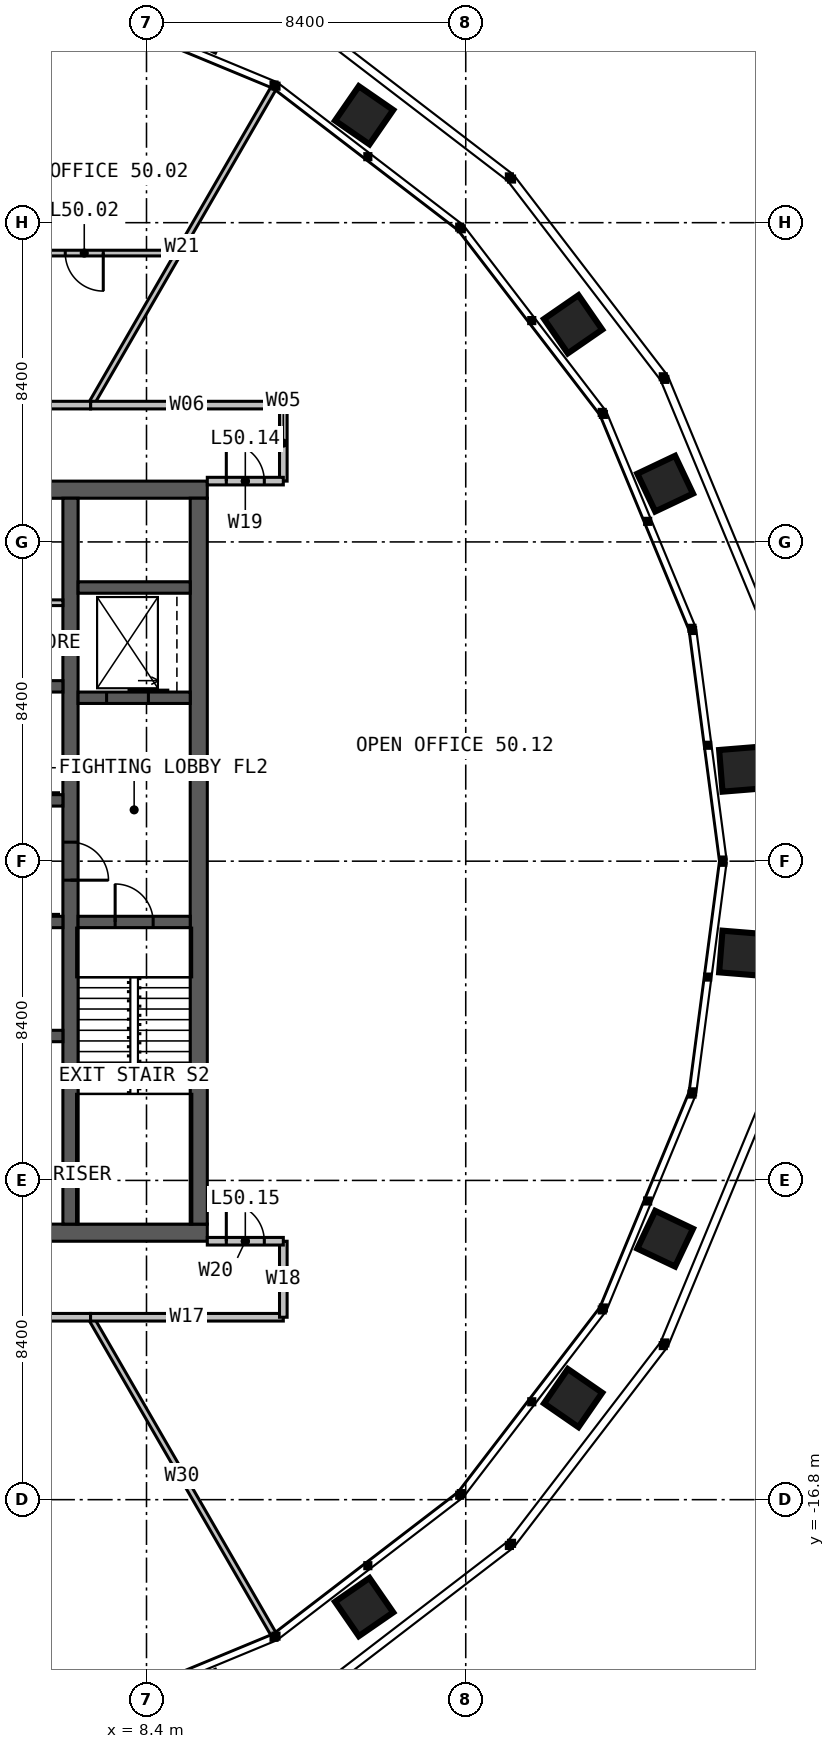
"""IFC4 building model, lengths in metres.
Left out: names, types, materials, properties, quantities, classifications, styles, units other than length and angle.
Written with IfcOpenShell. Run it as: python <this file> out.ifc"""

import sys

from ifc_helpers import new_model, si_unit, direction, frame, frame_2d, origin, place, context, subcontext, project, spatial, rectangle, extrude, element, fill, save


model = new_model("IFC4")
c1 = context("Model", 3, precision=1e-05, world=origin(), true_north=direction((0.0, 1.0)))
c2 = subcontext(c1, "Body", "Model", "MODEL_VIEW")
j1 = project(units=[si_unit("LENGTHUNIT", "METRE"), si_unit("PLANEANGLEUNIT", "RADIAN")], contexts=[c1])
p1 = place(None, origin())
s1 = spatial("IfcSite", under=j1, at=p1, CompositionType="ELEMENT")
p2 = place(p1, origin())
s2 = spatial("IfcBuilding", under=s1, at=p2, CompositionType="ELEMENT")
p3 = place(p2, frame((0.0, 0.0, 207.0)))
s3 = spatial("IfcBuildingStorey", under=s2, at=p3, CompositionType="ELEMENT", Elevation=207.0)
p4 = place(p3, frame((-10.0, 9.775, 0.0), z_axis=(0.0, 0.0, 1.0), x_axis=(1.0, 0.0, 0.0)))
e1 = element("IfcWall", 1, at=p4, inside=s3, PredefinedType="SOLIDWALL", context=c2, shape_type="SweptSolid", body=[
    extrude(rectangle(XDim=20.0, YDim=0.45, at=frame_2d((10.0, 0.0))), origin(), (0.0, 0.0, 1.0), 4.0),
])
p5 = place(p4, frame((9.4, 0.0, 0.0)))
e2 = element("IfcOpeningElement", 2, at=p5, cuts=e1, PredefinedType="OPENING", context=c2, shape_type="SweptSolid", body=[
    extrude(rectangle(XDim=1.2, YDim=2.2, at=frame_2d((0.6, 1.1))), frame((0.0, 0.235, 0.0), z_axis=(0.0, -1.0, 0.0), x_axis=(1.0, 0.0, 0.0)), (0.0, 0.0, 1.0), 0.47),
])
p6 = place(p3, frame((10.0, -9.775, 0.0), z_axis=(0.0, 0.0, 1.0), x_axis=(-1.0, 0.0, 0.0)))
e3 = element("IfcWall", 3, at=p6, inside=s3, PredefinedType="SOLIDWALL", context=c2, shape_type="SweptSolid", body=[
    extrude(rectangle(XDim=20.0, YDim=0.45, at=frame_2d((10.0, 0.0))), origin(), (0.0, 0.0, 1.0), 4.0),
])
p7 = place(p6, frame((6.875, 0.0, 0.0)))
e4 = element("IfcOpeningElement", 4, at=p7, cuts=e3, PredefinedType="OPENING", context=c2, shape_type="SweptSolid", body=[
    extrude(rectangle(XDim=1.2, YDim=2.2, at=frame_2d((0.6, 1.1))), frame((0.0, 0.235, 0.0), z_axis=(0.0, -1.0, 0.0), x_axis=(1.0, 0.0, 0.0)), (0.0, 0.0, 1.0), 0.47),
])
p8 = place(p3, frame((9.775, -9.55, 0.0), z_axis=(0.0, 0.0, 1.0), x_axis=(0.0, 1.0, 0.0)))
e5 = element("IfcWall", 5, at=p8, inside=s3, PredefinedType="SOLIDWALL", context=c2, shape_type="SweptSolid", body=[
    extrude(rectangle(XDim=19.1, YDim=0.45, at=frame_2d((9.55, 0.0))), origin(), (0.0, 0.0, 1.0), 4.0),
])
p9 = place(p3, frame((6.4, 9.55, 0.0), z_axis=(0.0, 0.0, 1.0), x_axis=(0.0, -1.0, 0.0)))
e6 = element("IfcWall", 6, at=p9, inside=s3, PredefinedType="SOLIDWALL", context=c2, shape_type="SweptSolid", body=[
    extrude(rectangle(XDim=19.1, YDim=0.4, at=frame_2d((9.55, 0.0))), origin(), (0.0, 0.0, 1.0), 4.0),
])
p10 = place(p9, frame((9.05, 0.0, 0.0)))
e7 = element("IfcOpeningElement", 7, at=p10, cuts=e6, PredefinedType="OPENING", context=c2, shape_type="SweptSolid", body=[
    extrude(rectangle(XDim=1.0, YDim=2.2, at=frame_2d((0.5, 1.1))), frame((0.0, 0.21, 0.0), z_axis=(0.0, -1.0, 0.0), x_axis=(1.0, 0.0, 0.0)), (0.0, 0.0, 1.0), 0.42),
])
p11 = place(p3, frame((1.35, 1.6, 0.0), z_axis=(0.0, 0.0, 1.0), x_axis=(1.0, 0.0, 0.0)))
e8 = element("IfcWall", 8, at=p11, inside=s3, PredefinedType="SOLIDWALL", context=c2, shape_type="SweptSolid", body=[
    extrude(rectangle(XDim=4.85, YDim=0.3, at=frame_2d((2.425, 0.0))), origin(), (0.0, 0.0, 1.0), 4.0),
])
p12 = place(p11, frame((0.6, 0.0, 0.0)))
e9 = element("IfcOpeningElement", 9, at=p12, cuts=e8, PredefinedType="OPENING", context=c2, shape_type="SweptSolid", body=[
    extrude(rectangle(XDim=1.1, YDim=2.2, at=frame_2d((0.55, 1.1))), frame((0.0, 0.16, 0.0), z_axis=(0.0, -1.0, 0.0), x_axis=(1.0, 0.0, 0.0)), (0.0, 0.0, 1.0), 0.32),
])
p13 = place(p11, frame((3.125, 0.0, 0.0)))
e10 = element("IfcOpeningElement", 10, at=p13, cuts=e8, PredefinedType="OPENING", context=c2, shape_type="SweptSolid", body=[
    extrude(rectangle(XDim=1.1, YDim=2.2, at=frame_2d((0.55, 1.1))), frame((0.0, 0.16, 0.0), z_axis=(0.0, -1.0, 0.0), x_axis=(1.0, 0.0, 0.0)), (0.0, 0.0, 1.0), 0.32),
])
p14 = place(p3, frame((1.35, 4.6, 0.0), z_axis=(0.0, 0.0, 1.0), x_axis=(1.0, 0.0, 0.0)))
e11 = element("IfcWall", 11, at=p14, inside=s3, PredefinedType="SOLIDWALL", context=c2, shape_type="SweptSolid", body=[
    extrude(rectangle(XDim=4.85, YDim=0.3, at=frame_2d((2.425, 0.0))), origin(), (0.0, 0.0, 1.0), 4.0),
])
p15 = place(p3, frame((3.85, -1.6, 0.0), z_axis=(0.0, 0.0, 1.0), x_axis=(1.0, 0.0, 0.0)))
e12 = element("IfcWall", 12, at=p15, inside=s3, PredefinedType="SOLIDWALL", context=c2, shape_type="SweptSolid", body=[
    extrude(rectangle(XDim=2.35, YDim=0.3, at=frame_2d((1.175, 0.0))), origin(), (0.0, 0.0, 1.0), 4.0),
])
p16 = place(p15, frame((0.625, 0.0, 0.0)))
e13 = element("IfcOpeningElement", 13, at=p16, cuts=e12, PredefinedType="OPENING", context=c2, shape_type="SweptSolid", body=[
    extrude(rectangle(XDim=1.1, YDim=2.2, at=frame_2d((0.55, 1.1))), frame((0.0, 0.16, 0.0), z_axis=(0.0, -1.0, 0.0), x_axis=(1.0, 0.0, 0.0)), (0.0, 0.0, 1.0), 0.32),
])
p17 = place(p3, frame((3.85, -4.6, 0.0), z_axis=(0.0, 0.0, 1.0), x_axis=(1.0, 0.0, 0.0)))
e14 = element("IfcWall", 14, at=p17, inside=s3, PredefinedType="SOLIDWALL", context=c2, shape_type="SweptSolid", body=[
    extrude(rectangle(XDim=2.35, YDim=0.3, at=frame_2d((1.175, 0.0))), origin(), (0.0, 0.0, 1.0), 4.0),
])
p18 = place(p3, frame((6.6, -1.6, 0.0), z_axis=(0.0, 0.0, 1.0), x_axis=(1.0, 0.0, 0.0)))
e15 = element("IfcWall", 15, at=p18, inside=s3, PredefinedType="SOLIDWALL", context=c2, shape_type="SweptSolid", body=[
    extrude(rectangle(XDim=2.95, YDim=0.3, at=frame_2d((1.475, 0.0))), origin(), (0.0, 0.0, 1.0), 4.0),
])
p19 = place(p18, frame((0.975, 0.0, 0.0)))
e16 = element("IfcOpeningElement", 16, at=p19, cuts=e15, PredefinedType="OPENING", context=c2, shape_type="SweptSolid", body=[
    extrude(rectangle(XDim=1.0, YDim=2.2, at=frame_2d((0.5, 1.1))), frame((0.0, 0.16, 0.0), z_axis=(0.0, -1.0, 0.0), x_axis=(1.0, 0.0, 0.0)), (0.0, 0.0, 1.0), 0.32),
])
p20 = place(p3, frame((6.6, 4.3, 0.0), z_axis=(0.0, 0.0, 1.0), x_axis=(1.0, 0.0, 0.0)))
e17 = element("IfcWall", 17, at=p20, inside=s3, PredefinedType="SOLIDWALL", context=c2, shape_type="SweptSolid", body=[
    extrude(rectangle(XDim=2.95, YDim=0.3, at=frame_2d((1.475, 0.0))), origin(), (0.0, 0.0, 1.0), 4.0),
])
p21 = place(p20, frame((0.75, 0.0, 0.0)))
e18 = element("IfcOpeningElement", 18, at=p21, cuts=e17, PredefinedType="OPENING", context=c2, shape_type="SweptSolid", body=[
    extrude(rectangle(XDim=1.1, YDim=2.2, at=frame_2d((0.55, 1.1))), frame((0.0, 0.16, 0.0), z_axis=(0.0, -1.0, 0.0), x_axis=(1.0, 0.0, 0.0)), (0.0, 0.0, 1.0), 0.32),
])
p22 = place(p3, frame((6.6, 7.2, 0.0), z_axis=(0.0, 0.0, 1.0), x_axis=(1.0, 0.0, 0.0)))
e19 = element("IfcWall", 19, at=p22, inside=s3, PredefinedType="SOLIDWALL", context=c2, shape_type="SweptSolid", body=[
    extrude(rectangle(XDim=2.95, YDim=0.3, at=frame_2d((1.475, 0.0))), origin(), (0.0, 0.0, 1.0), 4.0),
])
p23 = place(p3, frame((1.35, 6.8, 0.0), z_axis=(0.0, 0.0, 1.0), x_axis=(1.0, 0.0, 0.0)))
e20 = element("IfcWall", 20, at=p23, inside=s3, PredefinedType="PARTITIONING", context=c2, shape_type="SweptSolid", body=[
    extrude(rectangle(XDim=4.85, YDim=0.15, at=frame_2d((2.425, 0.0))), origin(), (0.0, 0.0, 1.0), 3.75),
])
p24 = place(p23, frame((3.15, 0.0, 0.0)))
e21 = element("IfcOpeningElement", 21, at=p24, cuts=e20, PredefinedType="OPENING", context=c2, shape_type="SweptSolid", body=[
    extrude(rectangle(XDim=0.9, YDim=2.2, at=frame_2d((0.45, 1.1))), frame((0.0, 0.085, 0.0), z_axis=(0.0, -1.0, 0.0), x_axis=(1.0, 0.0, 0.0)), (0.0, 0.0, 1.0), 0.17),
])
for number, where, z_axis, x_axis in (
    (22, (6.928, 12.0, 0.0), (0.0, 0.0, 1.0), (0.5, 0.866, 0.0)),
    (23, (6.928, -12.0, 0.0), (0.0, 0.0, 1.0), (0.5, -0.866, 0.0)),
):
    element("IfcWall", number, at=place(p3, frame(where, z_axis=z_axis, x_axis=x_axis)), inside=s3, PredefinedType="PARTITIONING", context=c2, shape_type="SweptSolid", body=[
        extrude(rectangle(XDim=9.62, YDim=0.15, at=frame_2d((4.81, 0.0))), origin(), (0.0, 0.0, 1.0), 2.79),
    ])
p25 = place(p3, frame((12.0, 10.0, 0.0), z_axis=(0.0, 0.0, 1.0), x_axis=(0.0, 1.0, 0.0)))
e24 = element("IfcWall", 24, at=p25, inside=s3, PredefinedType="PARTITIONING", context=c2, shape_type="SweptSolid", body=[
    extrude(rectangle(XDim=2.0, YDim=0.2, at=frame_2d((1.0, 0.0))), origin(), (0.0, 0.0, 1.0), 3.8),
])
p26 = place(p3, frame((12.0, 12.0, 0.0), z_axis=(0.0, 0.0, 1.0), x_axis=(-1.0, 0.0, 0.0)))
e25 = element("IfcWall", 25, at=p26, inside=s3, PredefinedType="PARTITIONING", context=c2, shape_type="SweptSolid", body=[
    extrude(rectangle(XDim=5.072, YDim=0.2, at=frame_2d((2.536, 0.0))), origin(), (0.0, 0.0, 1.0), 3.8),
])
p27 = place(p3, frame((9.238, 16.0, 0.0), z_axis=(0.0, 0.0, 1.0), x_axis=(-1.0, 0.0, 0.0)))
e26 = element("IfcWall", 26, at=p27, inside=s3, PredefinedType="PARTITIONING", context=c2, shape_type="SweptSolid", body=[
    extrude(rectangle(XDim=13.525, YDim=0.15, at=frame_2d((6.762, 0.0))), origin(), (0.0, 0.0, 1.0), 2.79),
])
p28 = place(p27, frame((1.975, 0.0, 0.0)))
e27 = element("IfcOpeningElement", 27, at=p28, cuts=e26, PredefinedType="OPENING", context=c2, shape_type="SweptSolid", body=[
    extrude(rectangle(XDim=1.0, YDim=2.2, at=frame_2d((0.5, 1.1))), frame((0.0, 0.085, 0.0), z_axis=(0.0, -1.0, 0.0), x_axis=(1.0, 0.0, 0.0)), (0.0, 0.0, 1.0), 0.17),
])
p29 = place(p27, frame((8.338, 0.0, 0.0)))
e28 = element("IfcOpeningElement", 28, at=p29, cuts=e26, PredefinedType="OPENING", context=c2, shape_type="SweptSolid", body=[
    extrude(rectangle(XDim=1.8, YDim=2.2, at=frame_2d((0.9, 1.1))), frame((0.0, 0.085, 0.0), z_axis=(0.0, -1.0, 0.0), x_axis=(1.0, 0.0, 0.0)), (0.0, 0.0, 1.0), 0.17),
])
p30 = place(p3, frame((4.287, 16.0, 0.0), z_axis=(0.0, 0.0, 1.0), x_axis=(0.258840841621, 0.965919985666, 0.0)))
e29 = element("IfcWall", 29, at=p30, inside=s3, PredefinedType="PARTITIONING", context=c2, shape_type="SweptSolid", body=[
    extrude(rectangle(XDim=6.912, YDim=0.15, at=frame_2d((3.456, 0.0))), origin(), (0.0, 0.0, 1.0), 2.79),
])
p31 = place(p3, frame((6.928, 12.0, 0.0), z_axis=(0.0, 0.0, 1.0), x_axis=(-1.0, 0.0, 0.0)))
e30 = element("IfcWall", 30, at=p31, inside=s3, PredefinedType="PARTITIONING", context=c2, shape_type="SweptSolid", body=[
    extrude(rectangle(XDim=10.144, YDim=0.2, at=frame_2d((5.072, 0.0))), origin(), (0.0, 0.0, 1.0), 3.8),
])
p32 = place(p31, frame((4.172, 0.0, 0.0)))
e31 = element("IfcOpeningElement", 31, at=p32, cuts=e30, PredefinedType="OPENING", context=c2, shape_type="SweptSolid", body=[
    extrude(rectangle(XDim=1.8, YDim=2.2, at=frame_2d((0.9, 1.1))), frame((0.0, 0.11, 0.0), z_axis=(0.0, -1.0, 0.0), x_axis=(1.0, 0.0, 0.0)), (0.0, 0.0, 1.0), 0.22),
])
p33 = place(p3, frame((-6.928, -12.0, 0.0), z_axis=(0.0, 0.0, 1.0), x_axis=(1.0, 0.0, 0.0)))
e32 = element("IfcWall", 32, at=p33, inside=s3, PredefinedType="PARTITIONING", context=c2, shape_type="SweptSolid", body=[
    extrude(rectangle(XDim=13.856, YDim=0.2, at=frame_2d((6.928, 0.0))), origin(), (0.0, 0.0, 1.0), 3.8),
])
p34 = place(p33, frame((6.028, 0.0, 0.0)))
e33 = element("IfcOpeningElement", 33, at=p34, cuts=e32, PredefinedType="OPENING", context=c2, shape_type="SweptSolid", body=[
    extrude(rectangle(XDim=1.8, YDim=2.2, at=frame_2d((0.9, 1.1))), frame((0.0, 0.11, 0.0), z_axis=(0.0, -1.0, 0.0), x_axis=(1.0, 0.0, 0.0)), (0.0, 0.0, 1.0), 0.22),
])
p35 = place(p3, frame((6.928, -12.0, 0.0), z_axis=(0.0, 0.0, 1.0), x_axis=(1.0, 0.0, 0.0)))
e34 = element("IfcWall", 34, at=p35, inside=s3, PredefinedType="PARTITIONING", context=c2, shape_type="SweptSolid", body=[
    extrude(rectangle(XDim=5.072, YDim=0.2, at=frame_2d((2.536, 0.0))), origin(), (0.0, 0.0, 1.0), 3.8),
])
p36 = place(p3, frame((12.0, -12.0, 0.0), z_axis=(0.0, 0.0, 1.0), x_axis=(0.0, 1.0, 0.0)))
e35 = element("IfcWall", 35, at=p36, inside=s3, PredefinedType="PARTITIONING", context=c2, shape_type="SweptSolid", body=[
    extrude(rectangle(XDim=2.0, YDim=0.2, at=frame_2d((1.0, 0.0))), origin(), (0.0, 0.0, 1.0), 3.8),
])
p37 = place(p3, frame((10.0, 10.0, 0.0), z_axis=(0.0, 0.0, 1.0), x_axis=(1.0, 0.0, 0.0)))
e36 = element("IfcWall", 36, at=p37, inside=s3, PredefinedType="PARTITIONING", context=c2, shape_type="SweptSolid", body=[
    extrude(rectangle(XDim=2.0, YDim=0.2, at=frame_2d((1.0, 0.0))), origin(), (0.0, 0.0, 1.0), 3.8),
])
p38 = place(p37, frame((0.5, 0.0, 0.0)))
e37 = element("IfcOpeningElement", 37, at=p38, cuts=e36, PredefinedType="OPENING", context=c2, shape_type="SweptSolid", body=[
    extrude(rectangle(XDim=1.0, YDim=2.2, at=frame_2d((0.5, 1.1))), frame((0.0, 0.11, 0.0), z_axis=(0.0, -1.0, 0.0), x_axis=(1.0, 0.0, 0.0)), (0.0, 0.0, 1.0), 0.22),
])
p39 = place(p3, frame((10.0, -10.0, 0.0), z_axis=(0.0, 0.0, 1.0), x_axis=(1.0, 0.0, 0.0)))
e38 = element("IfcWall", 38, at=p39, inside=s3, PredefinedType="PARTITIONING", context=c2, shape_type="SweptSolid", body=[
    extrude(rectangle(XDim=2.0, YDim=0.2, at=frame_2d((1.0, 0.0))), origin(), (0.0, 0.0, 1.0), 3.8),
])
p40 = place(p39, frame((0.5, 0.0, 0.0)))
e39 = element("IfcOpeningElement", 39, at=p40, cuts=e38, PredefinedType="OPENING", context=c2, shape_type="SweptSolid", body=[
    extrude(rectangle(XDim=1.0, YDim=2.2, at=frame_2d((0.5, 1.1))), frame((0.0, 0.11, 0.0), z_axis=(0.0, -1.0, 0.0), x_axis=(1.0, 0.0, 0.0)), (0.0, 0.0, 1.0), 0.22),
])
p41 = place(p10, origin())
e40 = element("IfcDoor", 40, at=p41, inside=s3, OperationType="SINGLE_SWING_RIGHT", PredefinedType="DOOR", context=c2, shape_type="SweptSolid", body=[
    extrude(rectangle(XDim=1.0, YDim=2.2, at=frame_2d((0.5, 1.1))), frame((0.0, 0.025, 0.0), z_axis=(0.0, -1.0, 0.0), x_axis=(1.0, 0.0, 0.0)), (0.0, 0.0, 1.0), 0.05),
])
fill(e7, e40)
p42 = place(p19, origin())
e41 = element("IfcDoor", 41, at=p42, inside=s3, OperationType="SINGLE_SWING_LEFT", PredefinedType="DOOR", context=c2, shape_type="SweptSolid", body=[
    extrude(rectangle(XDim=1.0, YDim=2.2, at=frame_2d((0.5, 1.1))), frame((0.0, 0.025, 0.0), z_axis=(0.0, -1.0, 0.0), x_axis=(1.0, 0.0, 0.0)), (0.0, 0.0, 1.0), 0.05),
])
fill(e16, e41)
p43 = place(p21, origin())
e42 = element("IfcDoor", 42, at=p43, inside=s3, OperationType="SLIDING_TO_LEFT", PredefinedType="DOOR", context=c2, shape_type="SweptSolid", body=[
    extrude(rectangle(XDim=1.1, YDim=2.2, at=frame_2d((0.55, 1.1))), frame((0.0, 0.025, 0.0), z_axis=(0.0, -1.0, 0.0), x_axis=(1.0, 0.0, 0.0)), (0.0, 0.0, 1.0), 0.05),
])
fill(e18, e42)
p44 = place(p28, origin())
e43 = element("IfcDoor", 43, at=p44, inside=s3, OperationType="SINGLE_SWING_LEFT", PredefinedType="DOOR", context=c2, shape_type="SweptSolid", body=[
    extrude(rectangle(XDim=1.0, YDim=2.2, at=frame_2d((0.5, 1.1))), frame((0.0, 0.025, 0.0), z_axis=(0.0, -1.0, 0.0), x_axis=(1.0, 0.0, 0.0)), (0.0, 0.0, 1.0), 0.05),
])
fill(e27, e43)
p45 = place(p38, origin())
e44 = element("IfcDoor", 44, at=p45, inside=s3, OperationType="SINGLE_SWING_LEFT", PredefinedType="DOOR", context=c2, shape_type="SweptSolid", body=[
    extrude(rectangle(XDim=1.0, YDim=2.2, at=frame_2d((0.5, 1.1))), frame((0.0, 0.025, 0.0), z_axis=(0.0, -1.0, 0.0), x_axis=(1.0, 0.0, 0.0)), (0.0, 0.0, 1.0), 0.05),
])
fill(e37, e44)
p46 = place(p40, origin())
e45 = element("IfcDoor", 45, at=p46, inside=s3, OperationType="SINGLE_SWING_LEFT", PredefinedType="DOOR", context=c2, shape_type="SweptSolid", body=[
    extrude(rectangle(XDim=1.0, YDim=2.2, at=frame_2d((0.5, 1.1))), frame((0.0, 0.025, 0.0), z_axis=(0.0, -1.0, 0.0), x_axis=(1.0, 0.0, 0.0)), (0.0, 0.0, 1.0), 0.05),
])
fill(e39, e45)
save(model, sys.argv[1])
